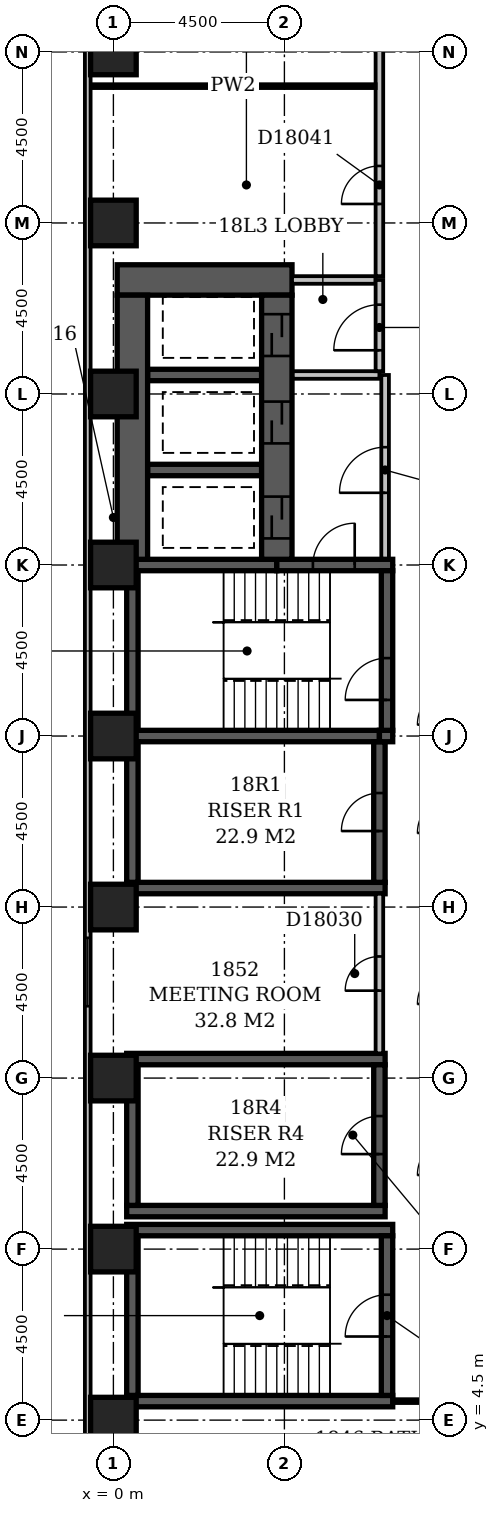
"""IFC4 building model, lengths in metres.
Left out: names, types, materials, properties, quantities, classifications, styles, units other than length and angle.
Written with IfcOpenShell. Run it as: python <this file> out.ifc"""

import sys

from ifc_helpers import new_model, si_unit, direction, frame, frame_2d, origin, origin_2d, place, context, subcontext, project, spatial, rectangle, extrude, element, fill, save


model = new_model("IFC4")
c1 = context("Model", 3, precision=1e-05, world=origin(), true_north=direction((0.0, 1.0)))
c2 = subcontext(c1, "Body", "Model", "MODEL_VIEW")
j1 = project(units=[si_unit("LENGTHUNIT", "METRE"), si_unit("PLANEANGLEUNIT", "RADIAN")], contexts=[c1])
p1 = place(None, origin())
s1 = spatial("IfcSite", under=j1, at=p1, CompositionType="ELEMENT")
p2 = place(p1, origin())
s2 = spatial("IfcBuilding", under=s1, at=p2, CompositionType="ELEMENT")
p3 = place(p2, frame((0.0, 0.0, 75.8)))
s3 = spatial("IfcBuildingStorey", under=s2, at=p3, CompositionType="ELEMENT", Elevation=75.8)
p4 = place(p3, frame((0.1, 34.5, -0.3), z_axis=(0.0, 0.0, 1.0), x_axis=(1.0, 0.0, 0.0)))
e1 = element("IfcWall", 1, at=p4, inside=s3, PredefinedType="SHEAR", context=c2, shape_type="SweptSolid", body=[
    extrude(rectangle(XDim=4.6, YDim=0.8, at=frame_2d((2.3, 0.0))), origin(), (0.0, 0.0, 1.0), 3.6),
])
for number, where, z_axis, x_axis in (
    (2, (0.35, 5.0, -0.3), (0.0, 0.0, 1.0), (1.0, 0.0, 0.0)),
    (3, (0.35, 9.5, -0.3), (0.0, 0.0, 1.0), (1.0, 0.0, 0.0)),
):
    element("IfcWall", number, at=place(p3, frame(where, z_axis=z_axis, x_axis=x_axis)), inside=s3, PredefinedType="SHEAR", context=c2, shape_type="SweptSolid", body=[
        extrude(rectangle(XDim=7.0, YDim=0.3, at=frame_2d((3.5, 0.0))), origin(), (0.0, 0.0, 1.0), 3.6),
    ])
for number, where, z_axis, x_axis in (
    (4, (0.35, 10.0, -0.3), (0.0, 0.0, 1.0), (1.0, 0.0, 0.0)),
    (5, (0.35, 14.0, -0.3), (0.0, 0.0, 1.0), (1.0, 0.0, 0.0)),
    (6, (0.35, 18.5, -0.3), (0.0, 0.0, 1.0), (1.0, 0.0, 0.0)),
):
    element("IfcWall", number, at=place(p3, frame(where, z_axis=z_axis, x_axis=x_axis)), inside=s3, PredefinedType="SHEAR", context=c2, shape_type="SweptSolid", body=[
        extrude(rectangle(XDim=6.8, YDim=0.3, at=frame_2d((3.4, 0.0))), origin(), (0.0, 0.0, 1.0), 3.6),
    ])
p5 = place(p3, frame((0.35, 22.5, -0.3), z_axis=(0.0, 0.0, 1.0), x_axis=(1.0, 0.0, 0.0)))
e7 = element("IfcWall", 7, at=p5, inside=s3, PredefinedType="SHEAR", context=c2, shape_type="SweptSolid", body=[
    extrude(rectangle(XDim=6.65, YDim=0.3, at=frame_2d((3.325, 0.0))), origin(), (0.0, 0.0, 1.0), 3.6),
])
p6 = place(p3, frame((0.35, 27.0, -0.3), z_axis=(0.0, 0.0, 1.0), x_axis=(1.0, 0.0, 0.0)))
e8 = element("IfcWall", 8, at=p6, inside=s3, PredefinedType="SHEAR", context=c2, shape_type="SweptSolid", body=[
    extrude(rectangle(XDim=3.95, YDim=0.3, at=frame_2d((1.975, 0.0))), origin(), (0.0, 0.0, 1.0), 3.6),
])
p7 = place(p3, frame((0.5, 5.15, -0.3), z_axis=(0.0, 0.0, 1.0), x_axis=(0.0, 1.0, 0.0)))
e9 = element("IfcWall", 9, at=p7, inside=s3, PredefinedType="SHEAR", context=c2, shape_type="SweptSolid", body=[
    extrude(rectangle(XDim=4.2, YDim=0.3, at=frame_2d((2.1, 0.0))), origin(), (0.0, 0.0, 1.0), 3.6),
])
for number, where, z_axis, x_axis in (
    (10, (0.5, 10.15, -0.3), (0.0, 0.0, 1.0), (0.0, 1.0, 0.0)),
    (11, (0.5, 18.65, -0.3), (0.0, 0.0, 1.0), (0.0, 1.0, 0.0)),
):
    element("IfcWall", number, at=place(p3, frame(where, z_axis=z_axis, x_axis=x_axis)), inside=s3, PredefinedType="SHEAR", context=c2, shape_type="SweptSolid", body=[
        extrude(rectangle(XDim=3.7, YDim=0.3, at=frame_2d((1.85, 0.0))), origin(), (0.0, 0.0, 1.0), 3.6),
    ])
p8 = place(p3, frame((0.5, 22.65, -0.3), z_axis=(0.0, 0.0, 1.0), x_axis=(0.0, 1.0, 0.0)))
e12 = element("IfcWall", 12, at=p8, inside=s3, PredefinedType="SHEAR", context=c2, shape_type="SweptSolid", body=[
    extrude(rectangle(XDim=4.2, YDim=0.3, at=frame_2d((2.1, 0.0))), origin(), (0.0, 0.0, 1.0), 3.6),
])
p9 = place(p3, frame((0.5, 27.15, -0.3), z_axis=(0.0, 0.0, 1.0), x_axis=(0.0, 1.0, 0.0)))
e13 = element("IfcWall", 13, at=p9, inside=s3, PredefinedType="SHEAR", context=c2, shape_type="SweptSolid", body=[
    extrude(rectangle(XDim=6.95, YDim=0.8, at=frame_2d((3.475, 0.0))), origin(), (0.0, 0.0, 1.0), 3.6),
])
for number, where, z_axis, x_axis in (
    (14, (0.9, 29.5, -0.3), (0.0, 0.0, 1.0), (1.0, 0.0, 0.0)),
    (15, (0.9, 32.0, -0.3), (0.0, 0.0, 1.0), (1.0, 0.0, 0.0)),
):
    element("IfcWall", number, at=place(p3, frame(where, z_axis=z_axis, x_axis=x_axis)), inside=s3, PredefinedType="SHEAR", context=c2, shape_type="SweptSolid", body=[
        extrude(rectangle(XDim=3.0, YDim=0.3, at=frame_2d((1.5, 0.0))), origin(), (0.0, 0.0, 1.0), 3.6),
    ])
p10 = place(p3, frame((4.3, 27.0, -0.3), z_axis=(0.0, 0.0, 1.0), x_axis=(1.0, 0.0, 0.0)))
e16 = element("IfcWall", 16, at=p10, inside=s3, PredefinedType="SHEAR", context=c2, shape_type="SweptSolid", body=[
    extrude(rectangle(XDim=3.05, YDim=0.3, at=frame_2d((1.525, 0.0))), origin(), (0.0, 0.0, 1.0), 3.6),
])
p11 = place(p10, frame((0.95, 0.0, 0.3)))
e17 = element("IfcOpeningElement", 17, at=p11, cuts=e16, PredefinedType="OPENING", context=c2, shape_type="SweptSolid", body=[
    extrude(rectangle(XDim=1.1, YDim=2.1, at=frame_2d((0.55, 1.05))), frame((0.0, 0.162, 0.0), z_axis=(0.0, -1.0, 0.0), x_axis=(1.0, 0.0, 0.0)), (0.0, 0.0, 1.0), 0.324),
])
p12 = place(p3, frame((4.3, 27.15, -0.3), z_axis=(0.0, 0.0, 1.0), x_axis=(0.0, 1.0, 0.0)))
e18 = element("IfcWall", 18, at=p12, inside=s3, PredefinedType="SHEAR", context=c2, shape_type="SweptSolid", body=[
    extrude(rectangle(XDim=6.95, YDim=0.8, at=frame_2d((3.475, 0.0))), origin(), (0.0, 0.0, 1.0), 3.6),
])
p13 = place(p12, frame((3.05, 0.0, 0.3)))
e19 = element("IfcOpeningElement", 19, at=p13, cuts=e18, PredefinedType="OPENING", context=c2, shape_type="SweptSolid", body=[
    extrude(rectangle(XDim=1.1, YDim=2.1, at=frame_2d((0.55, 1.05))), frame((0.0, 0.412, 0.0), z_axis=(0.0, -1.0, 0.0), x_axis=(1.0, 0.0, 0.0)), (0.0, 0.0, 1.0), 0.824),
])
p14 = place(p12, frame((0.55, 0.0, 0.3)))
e20 = element("IfcOpeningElement", 20, at=p14, cuts=e18, PredefinedType="OPENING", context=c2, shape_type="SweptSolid", body=[
    extrude(rectangle(XDim=1.1, YDim=2.1, at=frame_2d((0.55, 1.05))), frame((0.0, 0.412, 0.0), z_axis=(0.0, -1.0, 0.0), x_axis=(1.0, 0.0, 0.0)), (0.0, 0.0, 1.0), 0.824),
])
p15 = place(p12, frame((5.35, 0.0, 0.3)))
e21 = element("IfcOpeningElement", 21, at=p15, cuts=e18, PredefinedType="OPENING", context=c2, shape_type="SweptSolid", body=[
    extrude(rectangle(XDim=1.1, YDim=2.1, at=frame_2d((0.55, 1.05))), frame((0.0, 0.412, 0.0), z_axis=(0.0, -1.0, 0.0), x_axis=(1.0, 0.0, 0.0)), (0.0, 0.0, 1.0), 0.824),
])
p16 = place(p3, frame((7.0, 10.15, -0.3), z_axis=(0.0, 0.0, 1.0), x_axis=(0.0, 1.0, 0.0)))
e22 = element("IfcWall", 22, at=p16, inside=s3, PredefinedType="SHEAR", context=c2, shape_type="SweptSolid", body=[
    extrude(rectangle(XDim=3.7, YDim=0.3, at=frame_2d((1.85, 0.0))), origin(), (0.0, 0.0, 1.0), 3.6),
])
p17 = place(p16, frame((1.35, 0.0, 0.3)))
e23 = element("IfcOpeningElement", 23, at=p17, cuts=e22, PredefinedType="OPENING", context=c2, shape_type="SweptSolid", body=[
    extrude(rectangle(XDim=1.0, YDim=2.1, at=frame_2d((0.5, 1.05))), frame((0.0, 0.162, 0.0), z_axis=(0.0, -1.0, 0.0), x_axis=(1.0, 0.0, 0.0)), (0.0, 0.0, 1.0), 0.324),
])
p18 = place(p3, frame((7.0, 18.65, -0.3), z_axis=(0.0, 0.0, 1.0), x_axis=(0.0, 1.0, 0.0)))
e24 = element("IfcWall", 24, at=p18, inside=s3, PredefinedType="SHEAR", context=c2, shape_type="SweptSolid", body=[
    extrude(rectangle(XDim=3.7, YDim=0.3, at=frame_2d((1.85, 0.0))), origin(), (0.0, 0.0, 1.0), 3.6),
])
p19 = place(p18, frame((1.35, 0.0, 0.3)))
e25 = element("IfcOpeningElement", 25, at=p19, cuts=e24, PredefinedType="OPENING", context=c2, shape_type="SweptSolid", body=[
    extrude(rectangle(XDim=1.0, YDim=2.1, at=frame_2d((0.5, 1.05))), frame((0.0, 0.162, 0.0), z_axis=(0.0, -1.0, 0.0), x_axis=(1.0, 0.0, 0.0)), (0.0, 0.0, 1.0), 0.324),
])
p20 = place(p3, frame((7.0, 22.5, -0.3), z_axis=(0.0, 0.0, 1.0), x_axis=(1.0, 0.0, 0.0)))
e26 = element("IfcWall", 26, at=p20, inside=s3, PredefinedType="SHEAR", context=c2, shape_type="SweptSolid", body=[
    extrude(rectangle(XDim=0.35, YDim=0.3, at=frame_2d((0.175, 0.0))), origin(), (0.0, 0.0, 1.0), 3.6),
])
p21 = place(p3, frame((7.2, 5.15, -0.3), z_axis=(0.0, 0.0, 1.0), x_axis=(0.0, 1.0, 0.0)))
e27 = element("IfcWall", 27, at=p21, inside=s3, PredefinedType="SHEAR", context=c2, shape_type="SweptSolid", body=[
    extrude(rectangle(XDim=4.2, YDim=0.3, at=frame_2d((2.1, 0.0))), origin(), (0.0, 0.0, 1.0), 3.6),
])
p22 = place(p21, frame((1.55, 0.0, 0.3)))
e28 = element("IfcOpeningElement", 28, at=p22, cuts=e27, PredefinedType="OPENING", context=c2, shape_type="SweptSolid", body=[
    extrude(rectangle(XDim=1.1, YDim=2.1, at=frame_2d((0.55, 1.05))), frame((0.0, 0.162, 0.0), z_axis=(0.0, -1.0, 0.0), x_axis=(1.0, 0.0, 0.0)), (0.0, 0.0, 1.0), 0.324),
])
p23 = place(p3, frame((7.2, 22.65, -0.3), z_axis=(0.0, 0.0, 1.0), x_axis=(0.0, 1.0, 0.0)))
e29 = element("IfcWall", 29, at=p23, inside=s3, PredefinedType="SHEAR", context=c2, shape_type="SweptSolid", body=[
    extrude(rectangle(XDim=4.2, YDim=0.3, at=frame_2d((2.1, 0.0))), origin(), (0.0, 0.0, 1.0), 3.6),
])
p24 = place(p23, frame((0.8, 0.0, 0.3)))
e30 = element("IfcOpeningElement", 30, at=p24, cuts=e29, PredefinedType="OPENING", context=c2, shape_type="SweptSolid", body=[
    extrude(rectangle(XDim=1.1, YDim=2.1, at=frame_2d((0.55, 1.05))), frame((0.0, 0.162, 0.0), z_axis=(0.0, -1.0, 0.0), x_axis=(1.0, 0.0, 0.0)), (0.0, 0.0, 1.0), 0.324),
])
for number, where, z_axis, x_axis in (
    (31, (0.0, 4.5, -0.3), (0.0, 0.0, 1.0), (1.0, 0.0, 0.0)),
    (32, (0.0, 9.0, -0.3), (0.0, 0.0, 1.0), (1.0, 0.0, 0.0)),
    (33, (0.0, 13.5, -0.3), (0.0, 0.0, 1.0), (1.0, 0.0, 0.0)),
    (34, (0.0, 18.0, -0.3), (0.0, 0.0, 1.0), (1.0, 0.0, 0.0)),
    (35, (0.0, 22.5, -0.3), (0.0, 0.0, 1.0), (1.0, 0.0, 0.0)),
    (36, (0.0, 27.0, -0.3), (0.0, 0.0, 1.0), (1.0, 0.0, 0.0)),
    (37, (0.0, 31.5, -0.3), (0.0, 0.0, 1.0), (1.0, 0.0, 0.0)),
    (38, (0.0, 36.0, -0.3), (0.0, 0.0, 1.0), (1.0, 0.0, 0.0)),
    (39, (0.0, 40.5, -0.3), (0.0, 0.0, 1.0), (1.0, 0.0, 0.0)),
):
    element("IfcColumn", number, at=place(p3, frame(where, z_axis=z_axis, x_axis=x_axis)), inside=s3, PredefinedType="COLUMN", context=c2, shape_type="SweptSolid", body=[
        extrude(rectangle(XDim=1.2, YDim=1.2, at=origin_2d()), origin(), (0.0, 0.0, 1.0), 3.6),
    ])
p25 = place(p3, frame((-0.675, 59.1, 0.0), z_axis=(0.0, 0.0, 1.0), x_axis=(0.0, -1.0, 0.0)))
e40 = element("IfcWall", 40, at=p25, inside=s3, PredefinedType="STANDARD", context=c2, shape_type="SweptSolid", body=[
    extrude(rectangle(XDim=55.35, YDim=0.15, at=frame_2d((27.675, 0.0))), origin(), (0.0, 0.0, 1.0), 2.7),
])
p26 = place(p25, frame((11.49, 0.0, 0.6)))
e41 = element("IfcOpeningElement", 41, at=p26, cuts=e40, PredefinedType="OPENING", context=c2, shape_type="SweptSolid", body=[
    extrude(rectangle(XDim=1.8, YDim=1.8, at=frame_2d((0.9, 0.9))), frame((0.0, 0.087, 0.0), z_axis=(0.0, -1.0, 0.0), x_axis=(1.0, 0.0, 0.0)), (0.0, 0.0, 1.0), 0.174),
])
p27 = place(p25, frame((14.91, 0.0, 0.6)))
e42 = element("IfcOpeningElement", 42, at=p27, cuts=e40, PredefinedType="OPENING", context=c2, shape_type="SweptSolid", body=[
    extrude(rectangle(XDim=1.8, YDim=1.8, at=frame_2d((0.9, 0.9))), frame((0.0, 0.087, 0.0), z_axis=(0.0, -1.0, 0.0), x_axis=(1.0, 0.0, 0.0)), (0.0, 0.0, 1.0), 0.174),
])
p28 = place(p25, frame((41.91, 0.0, 0.6)))
e43 = element("IfcOpeningElement", 43, at=p28, cuts=e40, PredefinedType="OPENING", context=c2, shape_type="SweptSolid", body=[
    extrude(rectangle(XDim=1.8, YDim=1.8, at=frame_2d((0.9, 0.9))), frame((0.0, 0.087, 0.0), z_axis=(0.0, -1.0, 0.0), x_axis=(1.0, 0.0, 0.0)), (0.0, 0.0, 1.0), 0.174),
])
p29 = place(p3, frame((4.72, 32.0, 0.0), z_axis=(0.0, 0.0, 1.0), x_axis=(1.0, 0.0, 0.0)))
e44 = element("IfcWall", 44, at=p29, inside=s3, PredefinedType="PARTITIONING", context=c2, shape_type="SweptSolid", body=[
    extrude(rectangle(XDim=2.28, YDim=0.2, at=frame_2d((1.14, 0.0))), origin(), (0.0, 0.0, 1.0), 3.3),
])
p30 = place(p3, frame((7.0, 32.1, 0.0), z_axis=(0.0, 0.0, 1.0), x_axis=(0.0, 1.0, 0.0)))
e45 = element("IfcWall", 45, at=p30, inside=s3, PredefinedType="PARTITIONING", context=c2, shape_type="SweptSolid", body=[
    extrude(rectangle(XDim=2.4, YDim=0.2, at=frame_2d((1.2, 0.0))), origin(), (0.0, 0.0, 1.0), 3.3),
])
p31 = place(p30, frame((0.55, 0.0, 0.0)))
e46 = element("IfcOpeningElement", 46, at=p31, cuts=e45, PredefinedType="OPENING", context=c2, shape_type="SweptSolid", body=[
    extrude(rectangle(XDim=1.2, YDim=2.1, at=frame_2d((0.6, 1.05))), frame((0.0, 0.112, 0.0), z_axis=(0.0, -1.0, 0.0), x_axis=(1.0, 0.0, 0.0)), (0.0, 0.0, 1.0), 0.224),
])
p32 = place(p3, frame((4.7, 34.5, 0.0), z_axis=(0.0, 0.0, 1.0), x_axis=(1.0, 0.0, 0.0)))
e47 = element("IfcWall", 47, at=p32, inside=s3, PredefinedType="PARTITIONING", context=c2, shape_type="SweptSolid", body=[
    extrude(rectangle(XDim=2.2, YDim=0.2, at=frame_2d((1.1, 0.0))), origin(), (0.0, 0.0, 1.0), 3.3),
])
p33 = place(p3, frame((7.15, 27.17, 0.0), z_axis=(0.0, 0.0, 1.0), x_axis=(0.0, 1.0, 0.0)))
e48 = element("IfcWall", 48, at=p33, inside=s3, PredefinedType="PARTITIONING", context=c2, shape_type="SweptSolid", body=[
    extrude(rectangle(XDim=4.83, YDim=0.2, at=frame_2d((2.415, 0.0))), origin(), (0.0, 0.0, 1.0), 3.3),
])
p34 = place(p33, frame((1.73, 0.0, 0.0)))
e49 = element("IfcOpeningElement", 49, at=p34, cuts=e48, PredefinedType="OPENING", context=c2, shape_type="SweptSolid", body=[
    extrude(rectangle(XDim=1.2, YDim=2.1, at=frame_2d((0.6, 1.05))), frame((0.0, 0.112, 0.0), z_axis=(0.0, -1.0, 0.0), x_axis=(1.0, 0.0, 0.0)), (0.0, 0.0, 1.0), 0.224),
])
p35 = place(p3, frame((0.0, 4.4, 0.0), z_axis=(0.0, 0.0, 1.0), x_axis=(0.0, 1.0, 0.0)))
e50 = element("IfcWall", 50, at=p35, inside=s3, PredefinedType="PARTITIONING", context=c2, shape_type="SweptSolid", body=[
    extrude(rectangle(XDim=0.7, YDim=0.1, at=frame_2d((0.35, 0.0))), origin(), (0.0, 0.0, 1.0), 2.7),
])
p36 = place(p3, frame((7.349, 5.0, 0.0), z_axis=(0.0, 0.0, 1.0), x_axis=(1.0, 0.0, 0.0)))
e51 = element("IfcWall", 51, at=p36, inside=s3, PredefinedType="PARTITIONING", context=c2, shape_type="SweptSolid", body=[
    extrude(rectangle(XDim=1.551, YDim=0.1, at=frame_2d((0.775, 0.0))), origin(), (0.0, 0.0, 1.0), 3.3),
])
p37 = place(p3, frame((7.0, 14.15, 0.0), z_axis=(0.0, 0.0, 1.0), x_axis=(0.0, 1.0, 0.0)))
e52 = element("IfcWall", 52, at=p37, inside=s3, PredefinedType="PARTITIONING", context=c2, shape_type="SweptSolid", body=[
    extrude(rectangle(XDim=4.2, YDim=0.2, at=frame_2d((2.1, 0.0))), origin(), (0.0, 0.0, 1.0), 3.3),
])
p38 = place(p37, frame((1.65, 0.0, 0.0)))
e53 = element("IfcOpeningElement", 53, at=p38, cuts=e52, PredefinedType="OPENING", context=c2, shape_type="SweptSolid", body=[
    extrude(rectangle(XDim=0.9, YDim=2.1, at=frame_2d((0.45, 1.05))), frame((0.0, 0.112, 0.0), z_axis=(0.0, -1.0, 0.0), x_axis=(1.0, 0.0, 0.0)), (0.0, 0.0, 1.0), 0.224),
])
p39 = place(p3, frame((7.0, 34.6, 0.0), z_axis=(0.0, 0.0, 1.0), x_axis=(0.0, 1.0, 0.0)))
e54 = element("IfcWall", 54, at=p39, inside=s3, PredefinedType="PARTITIONING", context=c2, shape_type="SweptSolid", body=[
    extrude(rectangle(XDim=14.8, YDim=0.2, at=frame_2d((7.4, 0.0))), origin(), (0.0, 0.0, 1.0), 3.3),
])
p40 = place(p39, frame((1.9, 0.0, 0.0)))
e55 = element("IfcOpeningElement", 55, at=p40, cuts=e54, PredefinedType="OPENING", context=c2, shape_type="SweptSolid", body=[
    extrude(rectangle(XDim=1.0, YDim=2.1, at=frame_2d((0.5, 1.05))), frame((0.0, 0.112, 0.0), z_axis=(0.0, -1.0, 0.0), x_axis=(1.0, 0.0, 0.0)), (0.0, 0.0, 1.0), 0.224),
])
p41 = place(p39, frame((9.45, 0.0, 0.0)))
e56 = element("IfcOpeningElement", 56, at=p41, cuts=e54, PredefinedType="OPENING", context=c2, shape_type="SweptSolid", body=[
    extrude(rectangle(XDim=0.9, YDim=2.1, at=frame_2d((0.45, 1.05))), frame((0.0, 0.112, 0.0), z_axis=(0.0, -1.0, 0.0), x_axis=(1.0, 0.0, 0.0)), (0.0, 0.0, 1.0), 0.224),
])
p42 = place(p3, frame((-0.6, 39.6, 0.0), z_axis=(0.0, 0.0, 1.0), x_axis=(1.0, 0.0, 0.0)))
e57 = element("IfcWall", 57, at=p42, inside=s3, PredefinedType="PARTITIONING", context=c2, shape_type="SweptSolid", body=[
    extrude(rectangle(XDim=7.5, YDim=0.1, at=frame_2d((3.75, 0.0))), origin(), (0.0, 0.0, 1.0), 3.3),
])
p43 = place(p28, origin())
e58 = element("IfcWindow", 58, at=p43, inside=s3, PartitioningType="SINGLE_PANEL", PredefinedType="WINDOW", context=c2, shape_type="SweptSolid", body=[
    extrude(rectangle(XDim=1.8, YDim=1.8, at=frame_2d((0.9, 0.9))), frame((0.0, 0.03, 0.0), z_axis=(0.0, -1.0, 0.0), x_axis=(1.0, 0.0, 0.0)), (0.0, 0.0, 1.0), 0.06),
])
fill(e43, e58)
p44 = place(p34, origin())
e59 = element("IfcDoor", 59, at=p44, inside=s3, OperationType="SINGLE_SWING_LEFT", PredefinedType="DOOR", context=c2, shape_type="SweptSolid", body=[
    extrude(rectangle(XDim=1.2, YDim=2.1, at=frame_2d((0.6, 1.05))), frame((0.0, 0.025, 0.0), z_axis=(0.0, -1.0, 0.0), x_axis=(1.0, 0.0, 0.0)), (0.0, 0.0, 1.0), 0.05),
])
fill(e49, e59)
p45 = place(p13, origin())
e60 = element("IfcDoor", 60, at=p45, inside=s3, OperationType="SLIDING_TO_LEFT", PredefinedType="DOOR", context=c2, shape_type="SweptSolid", body=[
    extrude(rectangle(XDim=1.1, YDim=2.1, at=frame_2d((0.55, 1.05))), frame((0.0, 0.025, 0.0), z_axis=(0.0, -1.0, 0.0), x_axis=(1.0, 0.0, 0.0)), (0.0, 0.0, 1.0), 0.05),
])
fill(e19, e60)
p46 = place(p14, origin())
e61 = element("IfcDoor", 61, at=p46, inside=s3, OperationType="SLIDING_TO_LEFT", PredefinedType="DOOR", context=c2, shape_type="SweptSolid", body=[
    extrude(rectangle(XDim=1.1, YDim=2.1, at=frame_2d((0.55, 1.05))), frame((0.0, 0.025, 0.0), z_axis=(0.0, -1.0, 0.0), x_axis=(1.0, 0.0, 0.0)), (0.0, 0.0, 1.0), 0.05),
])
fill(e20, e61)
p47 = place(p31, origin())
e62 = element("IfcDoor", 62, at=p47, inside=s3, OperationType="SINGLE_SWING_LEFT", PredefinedType="DOOR", context=c2, shape_type="SweptSolid", body=[
    extrude(rectangle(XDim=1.2, YDim=2.1, at=frame_2d((0.6, 1.05))), frame((0.0, 0.025, 0.0), z_axis=(0.0, -1.0, 0.0), x_axis=(1.0, 0.0, 0.0)), (0.0, 0.0, 1.0), 0.05),
])
fill(e46, e62)
p48 = place(p15, origin())
e63 = element("IfcDoor", 63, at=p48, inside=s3, OperationType="SLIDING_TO_LEFT", PredefinedType="DOOR", context=c2, shape_type="SweptSolid", body=[
    extrude(rectangle(XDim=1.1, YDim=2.1, at=frame_2d((0.55, 1.05))), frame((0.0, 0.025, 0.0), z_axis=(0.0, -1.0, 0.0), x_axis=(1.0, 0.0, 0.0)), (0.0, 0.0, 1.0), 0.05),
])
fill(e21, e63)
p49 = place(p19, origin())
e64 = element("IfcDoor", 64, at=p49, inside=s3, OperationType="SINGLE_SWING_LEFT", PredefinedType="DOOR", context=c2, shape_type="SweptSolid", body=[
    extrude(rectangle(XDim=1.0, YDim=2.1, at=frame_2d((0.5, 1.05))), frame((0.0, 0.025, 0.0), z_axis=(0.0, -1.0, 0.0), x_axis=(1.0, 0.0, 0.0)), (0.0, 0.0, 1.0), 0.05),
])
fill(e25, e64)
p50 = place(p17, origin())
e65 = element("IfcDoor", 65, at=p50, inside=s3, OperationType="SINGLE_SWING_LEFT", PredefinedType="DOOR", context=c2, shape_type="SweptSolid", body=[
    extrude(rectangle(XDim=1.0, YDim=2.1, at=frame_2d((0.5, 1.05))), frame((0.0, 0.025, 0.0), z_axis=(0.0, -1.0, 0.0), x_axis=(1.0, 0.0, 0.0)), (0.0, 0.0, 1.0), 0.05),
])
fill(e23, e65)
p51 = place(p11, frame((1.1, 0.0, 0.0), z_axis=(0.0, 0.0, 1.0), x_axis=(-1.0, 0.0, 0.0)))
e66 = element("IfcDoor", 66, at=p51, inside=s3, OperationType="SINGLE_SWING_LEFT", PredefinedType="DOOR", context=c2, shape_type="SweptSolid", body=[
    extrude(rectangle(XDim=1.1, YDim=2.1, at=frame_2d((0.55, 1.05))), frame((0.0, 0.025, 0.0), z_axis=(0.0, -1.0, 0.0), x_axis=(1.0, 0.0, 0.0)), (0.0, 0.0, 1.0), 0.05),
])
fill(e17, e66)
p52 = place(p24, origin())
e67 = element("IfcDoor", 67, at=p52, inside=s3, OperationType="SINGLE_SWING_LEFT", PredefinedType="DOOR", context=c2, shape_type="SweptSolid", body=[
    extrude(rectangle(XDim=1.1, YDim=2.1, at=frame_2d((0.55, 1.05))), frame((0.0, 0.025, 0.0), z_axis=(0.0, -1.0, 0.0), x_axis=(1.0, 0.0, 0.0)), (0.0, 0.0, 1.0), 0.05),
])
fill(e30, e67)
p53 = place(p22, origin())
e68 = element("IfcDoor", 68, at=p53, inside=s3, OperationType="SINGLE_SWING_LEFT", PredefinedType="DOOR", context=c2, shape_type="SweptSolid", body=[
    extrude(rectangle(XDim=1.1, YDim=2.1, at=frame_2d((0.55, 1.05))), frame((0.0, 0.025, 0.0), z_axis=(0.0, -1.0, 0.0), x_axis=(1.0, 0.0, 0.0)), (0.0, 0.0, 1.0), 0.05),
])
fill(e28, e68)
p54 = place(p38, origin())
e69 = element("IfcDoor", 69, at=p54, inside=s3, OperationType="SINGLE_SWING_LEFT", PredefinedType="DOOR", context=c2, shape_type="SweptSolid", body=[
    extrude(rectangle(XDim=0.9, YDim=2.1, at=frame_2d((0.45, 1.05))), frame((0.0, 0.025, 0.0), z_axis=(0.0, -1.0, 0.0), x_axis=(1.0, 0.0, 0.0)), (0.0, 0.0, 1.0), 0.05),
])
fill(e53, e69)
p55 = place(p40, origin())
e70 = element("IfcDoor", 70, at=p55, inside=s3, OperationType="SINGLE_SWING_LEFT", PredefinedType="DOOR", context=c2, shape_type="SweptSolid", body=[
    extrude(rectangle(XDim=1.0, YDim=2.1, at=frame_2d((0.5, 1.05))), frame((0.0, 0.025, 0.0), z_axis=(0.0, -1.0, 0.0), x_axis=(1.0, 0.0, 0.0)), (0.0, 0.0, 1.0), 0.05),
])
fill(e55, e70)
save(model, sys.argv[1])
